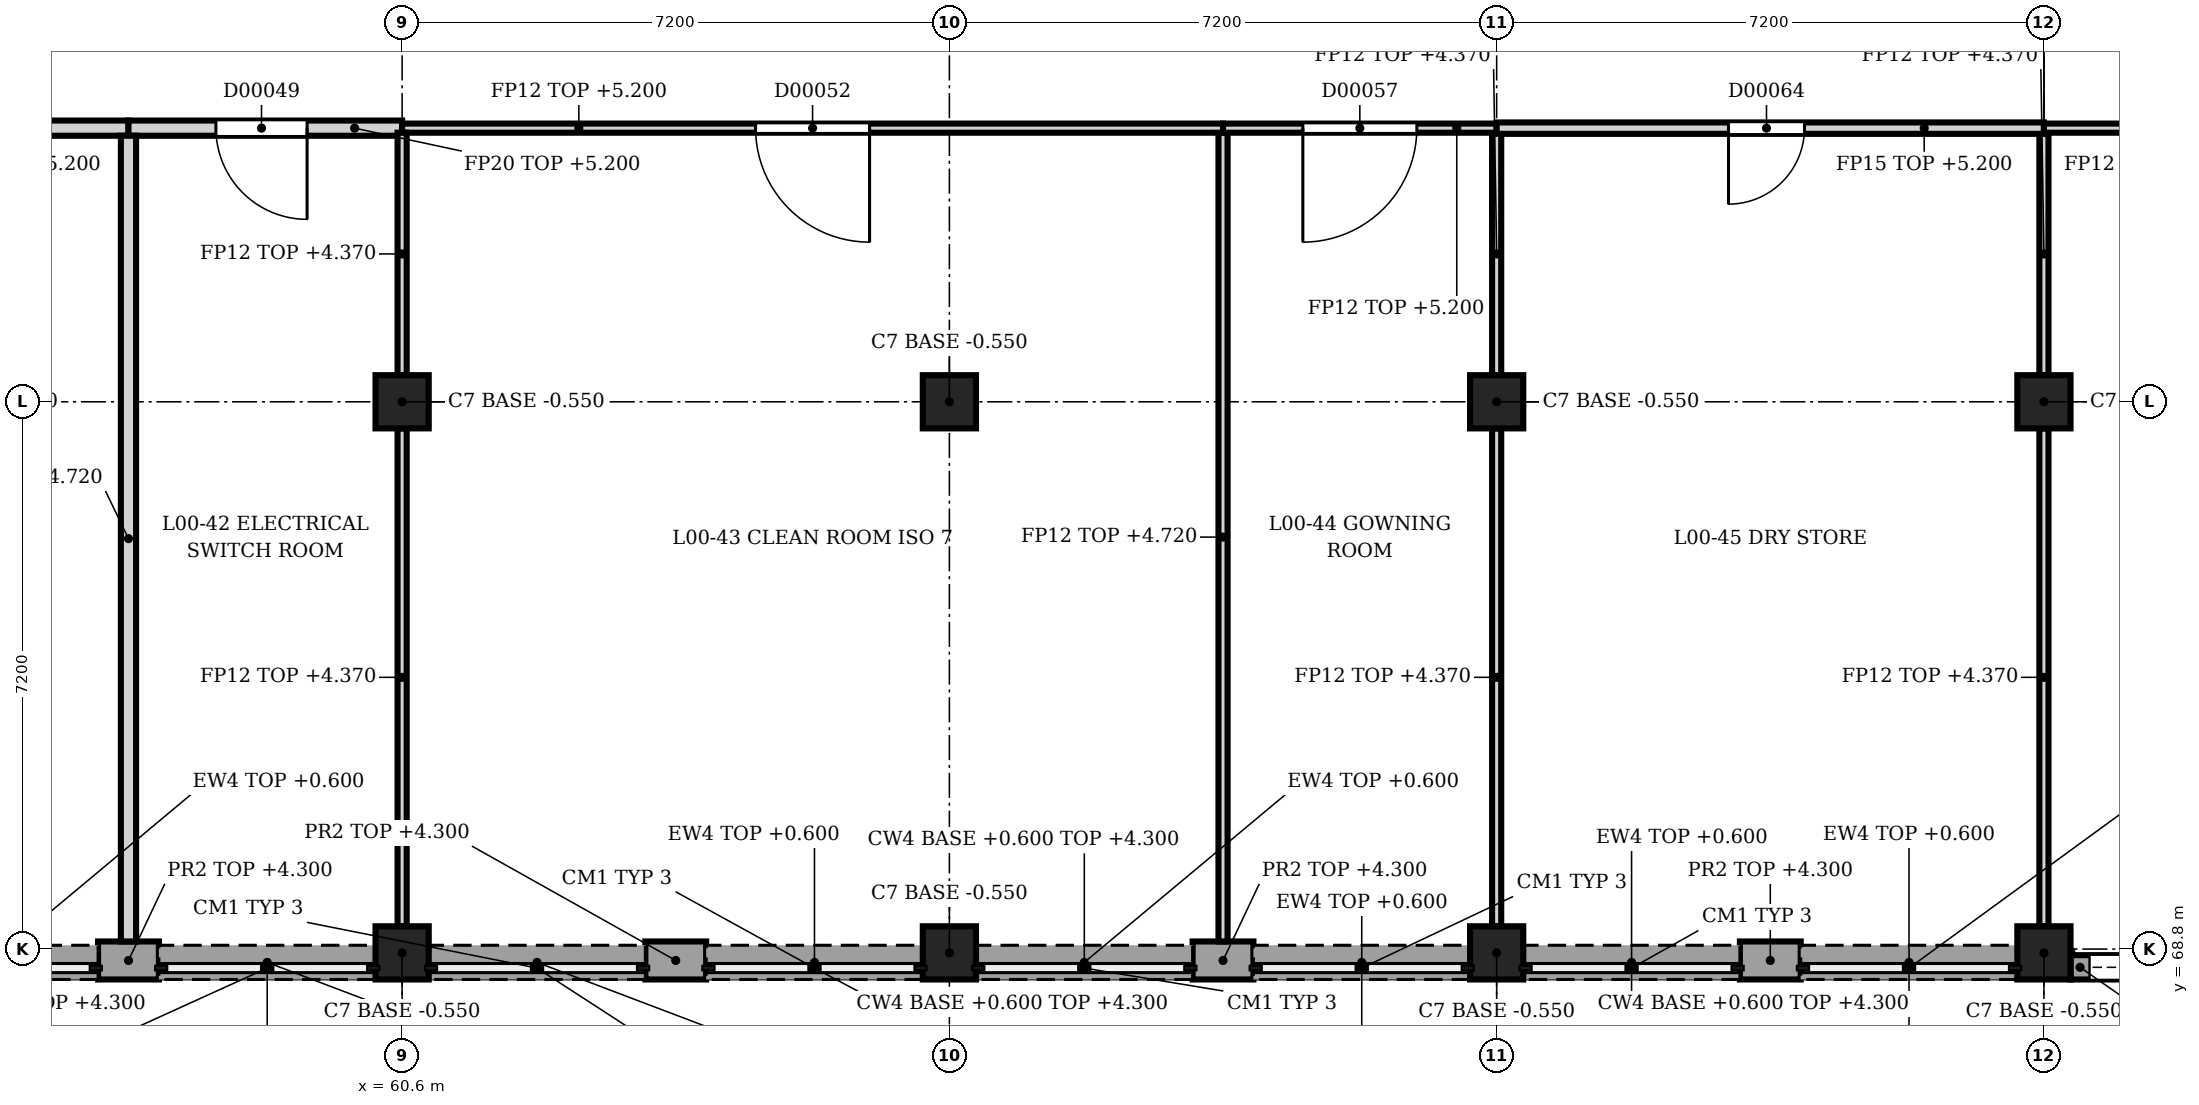
"""IFC4 building model, lengths in metres.
Left out: names, types, materials, properties, quantities, classifications, styles, units other than length and angle.
Written with IfcOpenShell. Run it as: python <this file> out.ifc"""

import sys

from ifc_helpers import new_model, si_unit, direction, frame, frame_2d, origin, origin_2d, place, context, subcontext, project, spatial, rectangle, extrude, element, fill, save


model = new_model("IFC4")
c1 = context("Model", 3, precision=1e-05, world=origin(), true_north=direction((0.0, 1.0)))
c2 = subcontext(c1, "Body", "Model", "MODEL_VIEW")
j1 = project(units=[si_unit("LENGTHUNIT", "METRE"), si_unit("PLANEANGLEUNIT", "RADIAN")], contexts=[c1])
p1 = place(None, origin())
s1 = spatial("IfcSite", under=j1, at=p1, CompositionType="ELEMENT")
p2 = place(p1, origin())
s2 = spatial("IfcBuilding", under=s1, at=p2, CompositionType="ELEMENT")
p3 = place(p2, origin())
s3 = spatial("IfcBuildingStorey", under=s2, at=p3, CompositionType="ELEMENT", Elevation=0.0)
for number, where, z_axis, x_axis in (
    (1, (60.6, 68.75, -0.55), (0.0, 0.0, 1.0), (1.0, 0.0, 0.0)),
    (2, (60.6, 76.0, -0.55), (0.0, 0.0, 1.0), (1.0, 0.0, 0.0)),
    (3, (67.8, 68.75, -0.55), (0.0, 0.0, 1.0), (1.0, 0.0, 0.0)),
    (4, (67.8, 76.0, -0.55), (0.0, 0.0, 1.0), (1.0, 0.0, 0.0)),
    (5, (75.0, 68.75, -0.55), (0.0, 0.0, 1.0), (1.0, 0.0, 0.0)),
    (6, (75.0, 76.0, -0.55), (0.0, 0.0, 1.0), (1.0, 0.0, 0.0)),
    (7, (82.2, 68.75, -0.55), (0.0, 0.0, 1.0), (1.0, 0.0, 0.0)),
    (8, (82.2, 76.0, -0.55), (0.0, 0.0, 1.0), (1.0, 0.0, 0.0)),
):
    element("IfcColumn", number, at=place(p3, frame(where, z_axis=z_axis, x_axis=x_axis)), inside=s3, PredefinedType="COLUMN", context=c2, shape_type="SweptSolid", body=[
        extrude(rectangle(XDim=0.7, YDim=0.7, at=origin_2d()), origin(), (0.0, 0.0, 1.0), 5.95),
    ])
p4 = place(p3, frame((85.4, 68.56, 0.0), z_axis=(0.0, 0.0, 1.0), x_axis=(-1.0, 0.0, 0.0)))
e9 = element("IfcWall", 9, at=p4, inside=s3, PredefinedType="SOLIDWALL", context=c2, shape_type="SweptSolid", body=[
    extrude(rectangle(XDim=2.85, YDim=0.32, at=frame_2d((1.425, 0.0))), origin(), (0.0, 0.0, 1.0), 4.3),
])
p5 = place(p4, frame((0.2, 0.0, 2.2)))
e10 = element("IfcOpeningElement", 10, at=p5, cuts=e9, PredefinedType="OPENING", context=c2, shape_type="SweptSolid", body=[
    extrude(rectangle(XDim=2.4, YDim=0.9, at=frame_2d((1.2, 0.45))), frame((0.0, 0.17, 0.0), z_axis=(0.0, -1.0, 0.0), x_axis=(1.0, 0.0, 0.0)), (0.0, 0.0, 1.0), 0.34),
])
for number, where, z_axis, x_axis in (
    (11, (79.0, 68.65, 0.0), (0.0, 0.0, 1.0), (-1.0, 0.0, 0.0)),
    (12, (71.8, 68.65, 0.0), (0.0, 0.0, 1.0), (-1.0, 0.0, 0.0)),
    (13, (64.6, 68.65, 0.0), (0.0, 0.0, 1.0), (-1.0, 0.0, 0.0)),
):
    element("IfcWall", number, at=place(p3, frame(where, z_axis=z_axis, x_axis=x_axis)), inside=s3, PredefinedType="SOLIDWALL", context=c2, shape_type="SweptSolid", body=[
        extrude(rectangle(XDim=0.8, YDim=0.5, at=frame_2d((0.4, 0.0))), origin(), (0.0, 0.0, 1.0), 4.3),
    ])
p6 = place(p3, frame((57.4, 68.65, 0.0), z_axis=(0.0, 0.0, 1.0), x_axis=(-1.0, 0.0, 0.0)))
e14 = element("IfcWall", 14, at=p6, inside=s3, PredefinedType="SOLIDWALL", context=c2, shape_type="SweptSolid", body=[
    extrude(rectangle(XDim=0.8, YDim=0.5, at=frame_2d((0.4, 0.0))), origin(), (0.0, 0.0, 1.0), 4.3),
])
p7 = place(p3, frame((81.85, 68.625, 0.0), z_axis=(0.0, 0.0, 1.0), x_axis=(-1.0, 0.0, 0.0)))
e15 = element("IfcWall", 15, at=p7, inside=s3, PredefinedType="SOLIDWALL", context=c2, shape_type="SweptSolid", body=[
    extrude(rectangle(XDim=2.85, YDim=0.45, at=frame_2d((1.425, 0.0))), origin(), (0.0, 0.0, 1.0), 0.6),
])
for number, where, z_axis, x_axis in (
    (16, (78.2, 68.625, 0.0), (0.0, 0.0, 1.0), (-1.0, 0.0, 0.0)),
    (17, (74.65, 68.625, 0.0), (0.0, 0.0, 1.0), (-1.0, 0.0, 0.0)),
):
    element("IfcWall", number, at=place(p3, frame(where, z_axis=z_axis, x_axis=x_axis)), inside=s3, PredefinedType="SOLIDWALL", context=c2, shape_type="SweptSolid", body=[
        extrude(rectangle(XDim=2.85, YDim=0.45, at=frame_2d((1.425, 0.0))), origin(), (0.0, 0.0, 1.0), 0.6),
    ])
p8 = place(p3, frame((71.0, 68.625, 0.0), z_axis=(0.0, 0.0, 1.0), x_axis=(-1.0, 0.0, 0.0)))
e18 = element("IfcWall", 18, at=p8, inside=s3, PredefinedType="SOLIDWALL", context=c2, shape_type="SweptSolid", body=[
    extrude(rectangle(XDim=2.85, YDim=0.45, at=frame_2d((1.425, 0.0))), origin(), (0.0, 0.0, 1.0), 0.6),
])
p9 = place(p3, frame((67.45, 68.625, 0.0), z_axis=(0.0, 0.0, 1.0), x_axis=(-1.0, 0.0, 0.0)))
e19 = element("IfcWall", 19, at=p9, inside=s3, PredefinedType="SOLIDWALL", context=c2, shape_type="SweptSolid", body=[
    extrude(rectangle(XDim=2.85, YDim=0.45, at=frame_2d((1.425, 0.0))), origin(), (0.0, 0.0, 1.0), 0.6),
])
for number, where, z_axis, x_axis in (
    (20, (63.8, 68.625, 0.0), (0.0, 0.0, 1.0), (-1.0, 0.0, 0.0)),
    (21, (60.25, 68.625, 0.0), (0.0, 0.0, 1.0), (-1.0, 0.0, 0.0)),
    (22, (56.6, 68.625, 0.0), (0.0, 0.0, 1.0), (-1.0, 0.0, 0.0)),
):
    element("IfcWall", number, at=place(p3, frame(where, z_axis=z_axis, x_axis=x_axis)), inside=s3, PredefinedType="SOLIDWALL", context=c2, shape_type="SweptSolid", body=[
        extrude(rectangle(XDim=2.85, YDim=0.45, at=frame_2d((1.425, 0.0))), origin(), (0.0, 0.0, 1.0), 0.6),
    ])
p10 = place(p3, frame((57.0, 79.6, 0.0), z_axis=(0.0, 0.0, 1.0), x_axis=(-1.0, 0.0, 0.0)))
e23 = element("IfcWall", 23, at=p10, inside=s3, PredefinedType="PARTITIONING", context=c2, shape_type="SweptSolid", body=[
    extrude(rectangle(XDim=7.2, YDim=0.2, at=frame_2d((3.6, 0.0))), origin(), (0.0, 0.0, 1.0), 5.2),
])
p11 = place(p10, frame((3.05, 0.0, 0.0)))
e24 = element("IfcOpeningElement", 24, at=p11, cuts=e23, PredefinedType="OPENING", context=c2, shape_type="SweptSolid", body=[
    extrude(rectangle(XDim=1.2, YDim=2.3, at=frame_2d((0.6, 1.15))), frame((0.0, 0.11, 0.0), z_axis=(0.0, -1.0, 0.0), x_axis=(1.0, 0.0, 0.0)), (0.0, 0.0, 1.0), 0.22),
])
p12 = place(p3, frame((60.6, 79.6, 0.0), z_axis=(0.0, 0.0, 1.0), x_axis=(-1.0, 0.0, 0.0)))
e25 = element("IfcWall", 25, at=p12, inside=s3, PredefinedType="PARTITIONING", context=c2, shape_type="SweptSolid", body=[
    extrude(rectangle(XDim=3.6, YDim=0.2, at=frame_2d((1.8, 0.0))), origin(), (0.0, 0.0, 1.0), 5.2),
])
p13 = place(p12, frame((1.25, 0.0, 0.0)))
e26 = element("IfcOpeningElement", 26, at=p13, cuts=e25, PredefinedType="OPENING", context=c2, shape_type="SweptSolid", body=[
    extrude(rectangle(XDim=1.2, YDim=2.3, at=frame_2d((0.6, 1.15))), frame((0.0, 0.11, 0.0), z_axis=(0.0, -1.0, 0.0), x_axis=(1.0, 0.0, 0.0)), (0.0, 0.0, 1.0), 0.22),
])
p14 = place(p3, frame((71.4, 79.6, 0.0), z_axis=(0.0, 0.0, 1.0), x_axis=(-1.0, 0.0, 0.0)))
e27 = element("IfcWall", 27, at=p14, inside=s3, PredefinedType="PARTITIONING", context=c2, shape_type="SweptSolid", body=[
    extrude(rectangle(XDim=10.8, YDim=0.12, at=frame_2d((5.4, 0.0))), origin(), (0.0, 0.0, 1.0), 5.2),
])
p15 = place(p14, frame((4.65, 0.0, 0.0)))
e28 = element("IfcOpeningElement", 28, at=p15, cuts=e27, PredefinedType="OPENING", context=c2, shape_type="SweptSolid", body=[
    extrude(rectangle(XDim=1.5, YDim=2.2, at=frame_2d((0.75, 1.1))), frame((0.0, 0.07, 0.0), z_axis=(0.0, -1.0, 0.0), x_axis=(1.0, 0.0, 0.0)), (0.0, 0.0, 1.0), 0.14),
])
p16 = place(p3, frame((75.0, 79.6, 0.0), z_axis=(0.0, 0.0, 1.0), x_axis=(-1.0, 0.0, 0.0)))
e29 = element("IfcWall", 29, at=p16, inside=s3, PredefinedType="PARTITIONING", context=c2, shape_type="SweptSolid", body=[
    extrude(rectangle(XDim=3.6, YDim=0.12, at=frame_2d((1.8, 0.0))), origin(), (0.0, 0.0, 1.0), 5.2),
])
p17 = place(p16, frame((1.05, 0.0, 0.0)))
e30 = element("IfcOpeningElement", 30, at=p17, cuts=e29, PredefinedType="OPENING", context=c2, shape_type="SweptSolid", body=[
    extrude(rectangle(XDim=1.5, YDim=2.1, at=frame_2d((0.75, 1.05))), frame((0.0, 0.07, 0.0), z_axis=(0.0, -1.0, 0.0), x_axis=(1.0, 0.0, 0.0)), (0.0, 0.0, 1.0), 0.14),
])
p18 = place(p3, frame((82.2, 79.6, 0.0), z_axis=(0.0, 0.0, 1.0), x_axis=(-1.0, 0.0, 0.0)))
e31 = element("IfcWall", 31, at=p18, inside=s3, PredefinedType="PARTITIONING", context=c2, shape_type="SweptSolid", body=[
    extrude(rectangle(XDim=7.2, YDim=0.15, at=frame_2d((3.6, 0.0))), origin(), (0.0, 0.0, 1.0), 5.2),
])
p19 = place(p18, frame((3.15, 0.0, 0.0)))
e32 = element("IfcOpeningElement", 32, at=p19, cuts=e31, PredefinedType="OPENING", context=c2, shape_type="SweptSolid", body=[
    extrude(rectangle(XDim=1.0, YDim=2.1, at=frame_2d((0.5, 1.05))), frame((0.0, 0.085, 0.0), z_axis=(0.0, -1.0, 0.0), x_axis=(1.0, 0.0, 0.0)), (0.0, 0.0, 1.0), 0.17),
])
p20 = place(p3, frame((89.4, 79.6, 0.0), z_axis=(0.0, 0.0, 1.0), x_axis=(-1.0, 0.0, 0.0)))
e33 = element("IfcWall", 33, at=p20, inside=s3, PredefinedType="PARTITIONING", context=c2, shape_type="SweptSolid", body=[
    extrude(rectangle(XDim=7.2, YDim=0.12, at=frame_2d((3.6, 0.0))), origin(), (0.0, 0.0, 1.0), 5.2),
])
p21 = place(p20, frame((2.85, 0.0, 0.0)))
e34 = element("IfcOpeningElement", 34, at=p21, cuts=e33, PredefinedType="OPENING", context=c2, shape_type="SweptSolid", body=[
    extrude(rectangle(XDim=1.5, YDim=2.1, at=frame_2d((0.75, 1.05))), frame((0.0, 0.07, 0.0), z_axis=(0.0, -1.0, 0.0), x_axis=(1.0, 0.0, 0.0)), (0.0, 0.0, 1.0), 0.14),
])
p22 = place(p3, frame((57.0, 68.9, 0.0), z_axis=(0.0, 0.0, 1.0), x_axis=(0.0, 1.0, 0.0)))
e35 = element("IfcWall", 35, at=p22, inside=s3, PredefinedType="PARTITIONING", context=c2, shape_type="SweptSolid", body=[
    extrude(rectangle(XDim=10.6, YDim=0.2, at=frame_2d((5.3, 0.0))), origin(), (0.0, 0.0, 1.0), 4.72),
])
p23 = place(p3, frame((60.6, 69.1, 0.0), z_axis=(0.0, 0.0, 1.0), x_axis=(0.0, 1.0, 0.0)))
e36 = element("IfcWall", 36, at=p23, inside=s3, PredefinedType="PARTITIONING", context=c2, shape_type="SweptSolid", body=[
    extrude(rectangle(XDim=6.55, YDim=0.12, at=frame_2d((3.275, 0.0))), origin(), (0.0, 0.0, 1.0), 4.37),
])
p24 = place(p3, frame((60.6, 76.35, 0.0), z_axis=(0.0, 0.0, 1.0), x_axis=(0.0, 1.0, 0.0)))
e37 = element("IfcWall", 37, at=p24, inside=s3, PredefinedType="PARTITIONING", context=c2, shape_type="SweptSolid", body=[
    extrude(rectangle(XDim=3.19, YDim=0.12, at=frame_2d((1.595, 0.0))), origin(), (0.0, 0.0, 1.0), 4.37),
])
p25 = place(p3, frame((71.4, 68.9, 0.0), z_axis=(0.0, 0.0, 1.0), x_axis=(0.0, 1.0, 0.0)))
e38 = element("IfcWall", 38, at=p25, inside=s3, PredefinedType="PARTITIONING", context=c2, shape_type="SweptSolid", body=[
    extrude(rectangle(XDim=10.64, YDim=0.12, at=frame_2d((5.32, 0.0))), origin(), (0.0, 0.0, 1.0), 4.72),
])
p26 = place(p3, frame((75.0, 69.1, 0.0), z_axis=(0.0, 0.0, 1.0), x_axis=(0.0, 1.0, 0.0)))
e39 = element("IfcWall", 39, at=p26, inside=s3, PredefinedType="PARTITIONING", context=c2, shape_type="SweptSolid", body=[
    extrude(rectangle(XDim=6.55, YDim=0.12, at=frame_2d((3.275, 0.0))), origin(), (0.0, 0.0, 1.0), 4.37),
])
p27 = place(p3, frame((75.0, 76.35, 0.0), z_axis=(0.0, 0.0, 1.0), x_axis=(0.0, 1.0, 0.0)))
e40 = element("IfcWall", 40, at=p27, inside=s3, PredefinedType="PARTITIONING", context=c2, shape_type="SweptSolid", body=[
    extrude(rectangle(XDim=3.19, YDim=0.12, at=frame_2d((1.595, 0.0))), origin(), (0.0, 0.0, 1.0), 4.37),
])
p28 = place(p3, frame((82.2, 69.1, 0.0), z_axis=(0.0, 0.0, 1.0), x_axis=(0.0, 1.0, 0.0)))
e41 = element("IfcWall", 41, at=p28, inside=s3, PredefinedType="PARTITIONING", context=c2, shape_type="SweptSolid", body=[
    extrude(rectangle(XDim=6.55, YDim=0.12, at=frame_2d((3.275, 0.0))), origin(), (0.0, 0.0, 1.0), 4.37),
])
p29 = place(p3, frame((82.2, 76.35, 0.0), z_axis=(0.0, 0.0, 1.0), x_axis=(0.0, 1.0, 0.0)))
e42 = element("IfcWall", 42, at=p29, inside=s3, PredefinedType="PARTITIONING", context=c2, shape_type="SweptSolid", body=[
    extrude(rectangle(XDim=3.19, YDim=0.12, at=frame_2d((1.595, 0.0))), origin(), (0.0, 0.0, 1.0), 4.37),
])
p30 = place(p5, origin())
e43 = element("IfcWindow", 43, at=p30, inside=s3, PartitioningType="SINGLE_PANEL", PredefinedType="WINDOW", context=c2, shape_type="SweptSolid", body=[
    extrude(rectangle(XDim=2.4, YDim=0.9, at=frame_2d((1.2, 0.45))), frame((0.0, 0.03, 0.0), z_axis=(0.0, -1.0, 0.0), x_axis=(1.0, 0.0, 0.0)), (0.0, 0.0, 1.0), 0.06),
])
fill(e10, e43)
p31 = place(p13, origin())
e44 = element("IfcDoor", 44, at=p31, inside=s3, OperationType="SINGLE_SWING_RIGHT", PredefinedType="DOOR", context=c2, shape_type="SweptSolid", body=[
    extrude(rectangle(XDim=1.2, YDim=2.3, at=frame_2d((0.6, 1.15))), frame((0.0, 0.025, 0.0), z_axis=(0.0, -1.0, 0.0), x_axis=(1.0, 0.0, 0.0)), (0.0, 0.0, 1.0), 0.05),
])
fill(e26, e44)
p32 = place(p15, origin())
e45 = element("IfcDoor", 45, at=p32, inside=s3, OperationType="SINGLE_SWING_RIGHT", PredefinedType="DOOR", context=c2, shape_type="SweptSolid", body=[
    extrude(rectangle(XDim=1.5, YDim=2.2, at=frame_2d((0.75, 1.1))), frame((0.0, 0.025, 0.0), z_axis=(0.0, -1.0, 0.0), x_axis=(1.0, 0.0, 0.0)), (0.0, 0.0, 1.0), 0.05),
])
fill(e28, e45)
p33 = place(p17, origin())
e46 = element("IfcDoor", 46, at=p33, inside=s3, OperationType="SINGLE_SWING_LEFT", PredefinedType="DOOR", context=c2, shape_type="SweptSolid", body=[
    extrude(rectangle(XDim=1.5, YDim=2.1, at=frame_2d((0.75, 1.05))), frame((0.0, 0.025, 0.0), z_axis=(0.0, -1.0, 0.0), x_axis=(1.0, 0.0, 0.0)), (0.0, 0.0, 1.0), 0.05),
])
fill(e30, e46)
p34 = place(p19, origin())
e47 = element("IfcDoor", 47, at=p34, inside=s3, OperationType="SINGLE_SWING_RIGHT", PredefinedType="DOOR", context=c2, shape_type="SweptSolid", body=[
    extrude(rectangle(XDim=1.0, YDim=2.1, at=frame_2d((0.5, 1.05))), frame((0.0, 0.025, 0.0), z_axis=(0.0, -1.0, 0.0), x_axis=(1.0, 0.0, 0.0)), (0.0, 0.0, 1.0), 0.05),
])
fill(e32, e47)
save(model, sys.argv[1])
